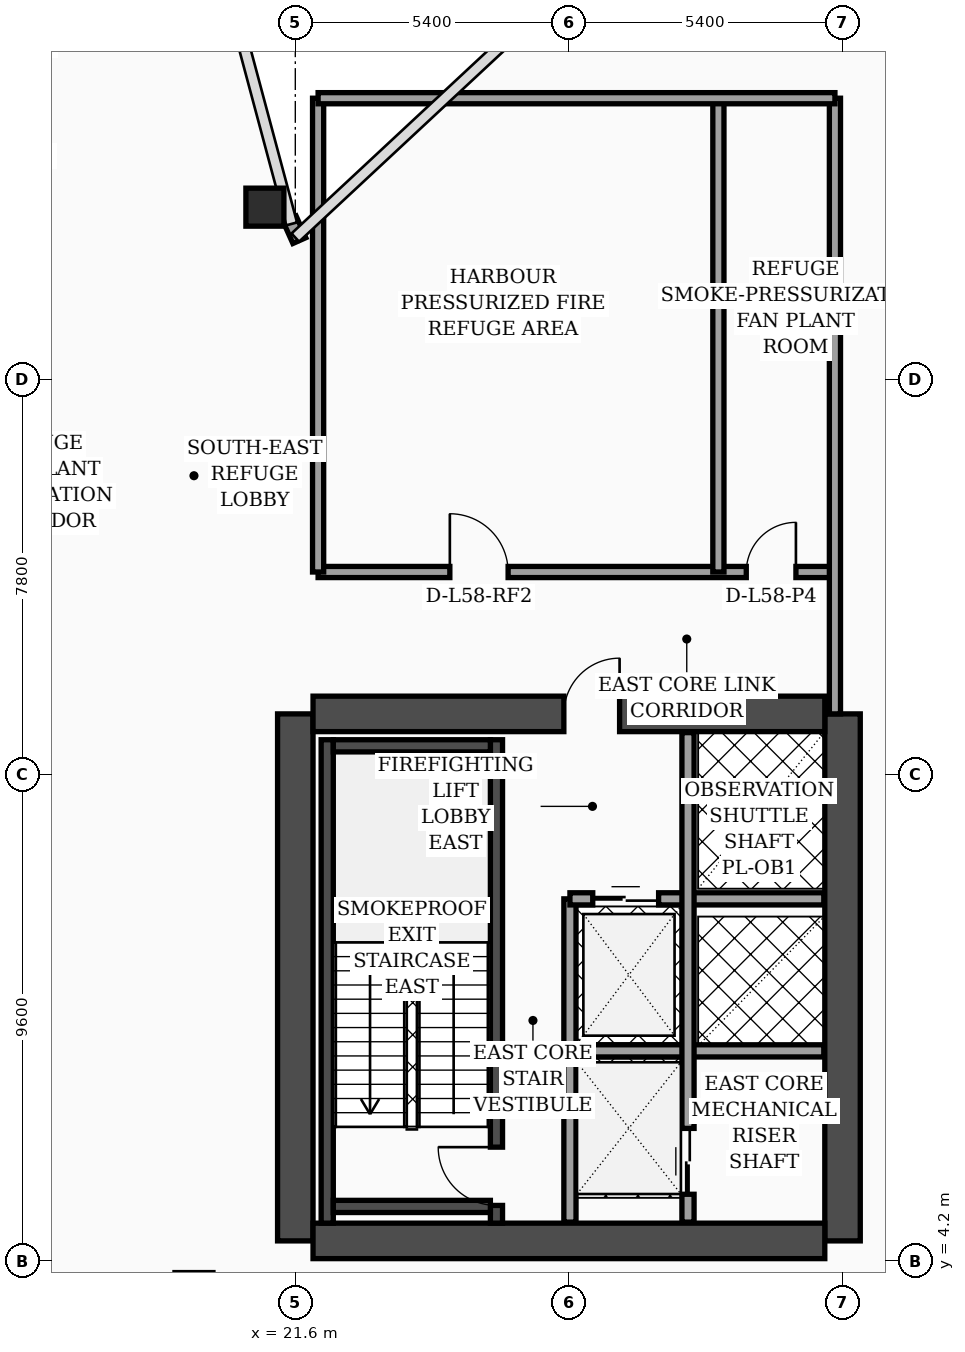
"""IFC4 building model, lengths in metres.
Left out: names, types, materials, properties, quantities, classifications, styles, units other than length and angle.
Written with IfcOpenShell. Run it as: python <this file> out.ifc"""

import sys

from ifc_helpers import new_model, si_unit, direction, frame, frame_2d, origin, origin_2d, place, context, subcontext, project, spatial, rectangle, hollow_rectangle, extrude, element, fill, save


model = new_model("IFC4")
c1 = context("Model", 3, precision=1e-05, world=origin(), true_north=direction((0.0, 1.0)))
c2 = subcontext(c1, "Body", "Model", "MODEL_VIEW")
j1 = project(units=[si_unit("LENGTHUNIT", "METRE"), si_unit("PLANEANGLEUNIT", "RADIAN")], contexts=[c1])
p1 = place(None, origin())
s1 = spatial("IfcSite", under=j1, at=p1, CompositionType="ELEMENT")
p2 = place(p1, origin())
s2 = spatial("IfcBuilding", under=s1, at=p2, CompositionType="ELEMENT")
p3 = place(p2, frame((0.0, 0.0, 234.5)))
s3 = spatial("IfcBuildingStorey", under=s2, at=p3, CompositionType="ELEMENT", Elevation=234.5)
for number, where, z_axis, x_axis in (
    (1, (21.6, 4.6, 0.0), (0.0, 0.0, 1.0), (0.0, 1.0, 0.0)),
    (2, (32.4, 4.6, 0.0), (0.0, 0.0, 1.0), (0.0, 1.0, 0.0)),
):
    element("IfcWall", number, at=place(p3, frame(where, z_axis=z_axis, x_axis=x_axis)), inside=s3, PredefinedType="SHEAR", context=c2, shape_type="SweptSolid", body=[
        extrude(rectangle(XDim=10.4, YDim=0.7, at=frame_2d((5.2, 0.0))), origin(), (0.0, 0.0, 1.0), 4.56),
    ])
p4 = place(p3, frame((21.95, 15.0, 0.0), z_axis=(0.0, 0.0, 1.0), x_axis=(1.0, 0.0, 0.0)))
e3 = element("IfcWall", 3, at=p4, inside=s3, PredefinedType="SHEAR", context=c2, shape_type="SweptSolid", body=[
    extrude(rectangle(XDim=10.1, YDim=0.7, at=frame_2d((5.05, 0.0))), origin(), (0.0, 0.0, 1.0), 4.56),
])
p5 = place(p4, frame((4.95, 0.0, 0.0)))
e4 = element("IfcOpeningElement", 4, at=p5, cuts=e3, PredefinedType="OPENING", context=c2, shape_type="SweptSolid", body=[
    extrude(rectangle(XDim=1.1, YDim=2.2, at=frame_2d((0.55, 1.1))), frame((0.0, 0.36, 0.0), z_axis=(0.0, -1.0, 0.0), x_axis=(1.0, 0.0, 0.0)), (0.0, 0.0, 1.0), 0.72),
])
p6 = place(p3, frame((21.95, 4.6, 0.0), z_axis=(0.0, 0.0, 1.0), x_axis=(1.0, 0.0, 0.0)))
e5 = element("IfcWall", 5, at=p6, inside=s3, PredefinedType="SHEAR", context=c2, shape_type="SweptSolid", body=[
    extrude(rectangle(XDim=10.1, YDim=0.7, at=frame_2d((5.05, 0.0))), origin(), (0.0, 0.0, 1.0), 4.56),
])
p7 = place(p3, frame((22.23, 4.95, 0.0), z_axis=(0.0, 0.0, 1.0), x_axis=(0.0, 1.0, 0.0)))
e6 = element("IfcWall", 6, at=p7, inside=s3, PredefinedType="SOLIDWALL", context=c2, shape_type="SweptSolid", body=[
    extrude(rectangle(XDim=9.54, YDim=0.24, at=frame_2d((4.77, 0.0))), origin(), (0.0, 0.0, 1.0), 4.56),
])
p8 = place(p3, frame((25.57, 4.95, 0.0), z_axis=(0.0, 0.0, 1.0), x_axis=(0.0, 1.0, 0.0)))
e7 = element("IfcWall", 7, at=p8, inside=s3, PredefinedType="SOLIDWALL", context=c2, shape_type="SweptSolid", body=[
    extrude(rectangle(XDim=9.54, YDim=0.24, at=frame_2d((4.77, 0.0))), origin(), (0.0, 0.0, 1.0), 4.56),
])
p9 = place(p8, frame((0.35, 0.0, 0.0)))
e8 = element("IfcOpeningElement", 8, at=p9, cuts=e7, PredefinedType="OPENING", context=c2, shape_type="SweptSolid", body=[
    extrude(rectangle(XDim=1.15, YDim=2.2, at=frame_2d((0.575, 1.1))), frame((0.0, 0.13, 0.0), z_axis=(0.0, -1.0, 0.0), x_axis=(1.0, 0.0, 0.0)), (0.0, 0.0, 1.0), 0.26),
])
for number, where, z_axis, x_axis in (
    (9, (22.35, 5.28, 0.0), (0.0, 0.0, 1.0), (1.0, 0.0, 0.0)),
    (10, (22.35, 14.37, 0.0), (0.0, 0.0, 1.0), (1.0, 0.0, 0.0)),
):
    element("IfcWall", number, at=place(p3, frame(where, z_axis=z_axis, x_axis=x_axis)), inside=s3, PredefinedType="SOLIDWALL", context=c2, shape_type="SweptSolid", body=[
        extrude(rectangle(XDim=3.1, YDim=0.24, at=frame_2d((1.55, 0.0))), origin(), (0.0, 0.0, 1.0), 4.56),
    ])
for number, where, z_axis, x_axis in (
    (11, (21.0, 25.0, 0.0), (0.0, 0.0, 1.0), (1.0, 0.0, 0.0)),
    (12, (19.6, 3.6, 0.0), (0.0, 0.0, 1.0), (1.0, 0.0, 0.0)),
):
    element("IfcColumn", number, at=place(p3, frame(where, z_axis=z_axis, x_axis=x_axis)), inside=s3, PredefinedType="COLUMN", context=c2, shape_type="SweptSolid", body=[
        extrude(hollow_rectangle(XDim=0.75, YDim=0.75, WallThickness=0.032, at=origin_2d()), origin(), (0.0, 0.0, 1.0), 4.56),
    ])
p10 = place(p3, frame((21.68, 24.34, 0.0), z_axis=(0.0, 0.0, 1.0), x_axis=(-0.40758134973, 0.913168901875, 0.0)))
e13 = element("IfcWall", 13, at=p10, inside=s3, PredefinedType="SOLIDWALL", context=c2, shape_type="SweptSolid", body=[
    extrude(rectangle(XDim=0.471, YDim=0.28, at=frame_2d((0.235, 0.0))), origin(), (0.0, 0.0, 1.0), 4.56),
])
p11 = place(p3, frame((27.02, 4.97, 0.0), z_axis=(0.0, 0.0, 1.0), x_axis=(0.0, 1.0, 0.0)))
e14 = element("IfcWall", 14, at=p11, inside=s3, PredefinedType="SOLIDWALL", context=c2, shape_type="SweptSolid", body=[
    extrude(rectangle(XDim=6.38, YDim=0.24, at=frame_2d((3.19, 0.0))), origin(), (0.0, 0.0, 1.0), 4.56),
])
p12 = place(p3, frame((27.02, 11.35, 0.0), z_axis=(0.0, 0.0, 1.0), x_axis=(1.0, 0.0, 0.0)))
e15 = element("IfcWall", 15, at=p12, inside=s3, PredefinedType="SOLIDWALL", context=c2, shape_type="SweptSolid", body=[
    extrude(rectangle(XDim=5.01, YDim=0.24, at=frame_2d((2.505, 0.0))), origin(), (0.0, 0.0, 1.0), 4.56),
])
p13 = place(p12, frame((0.45, 0.0, 0.0)))
e16 = element("IfcOpeningElement", 16, at=p13, cuts=e15, PredefinedType="OPENING", context=c2, shape_type="SweptSolid", body=[
    extrude(rectangle(XDim=1.3, YDim=2.35, at=frame_2d((0.65, 1.175))), frame((0.0, 0.13, 0.0), z_axis=(0.0, -1.0, 0.0), x_axis=(1.0, 0.0, 0.0)), (0.0, 0.0, 1.0), 0.26),
])
p14 = place(p3, frame((27.02, 8.35, 0.0), z_axis=(0.0, 0.0, 1.0), x_axis=(1.0, 0.0, 0.0)))
e17 = element("IfcWall", 17, at=p14, inside=s3, PredefinedType="SOLIDWALL", context=c2, shape_type="SweptSolid", body=[
    extrude(rectangle(XDim=5.01, YDim=0.24, at=frame_2d((2.505, 0.0))), origin(), (0.0, 0.0, 1.0), 4.09),
])
p15 = place(p3, frame((29.35, 4.97, 0.0), z_axis=(0.0, 0.0, 1.0), x_axis=(0.0, 1.0, 0.0)))
e18 = element("IfcWall", 18, at=p15, inside=s3, PredefinedType="SOLIDWALL", context=c2, shape_type="SweptSolid", body=[
    extrude(rectangle(XDim=9.66, YDim=0.24, at=frame_2d((4.83, 0.0))), origin(), (0.0, 0.0, 1.0), 4.56),
])
p16 = place(p15, frame((0.55, 0.0, 0.0)))
e19 = element("IfcOpeningElement", 19, at=p16, cuts=e18, PredefinedType="OPENING", context=c2, shape_type="SweptSolid", body=[
    extrude(rectangle(XDim=1.3, YDim=2.35, at=frame_2d((0.65, 1.175))), frame((0.0, 0.13, 0.0), z_axis=(0.0, -1.0, 0.0), x_axis=(1.0, 0.0, 0.0)), (0.0, 0.0, 1.0), 0.26),
])
p17 = place(p3, frame((22.05, 17.8, 0.0), z_axis=(0.0, 0.0, 1.0), x_axis=(1.0, 0.0, 0.0)))
e20 = element("IfcWall", 20, at=p17, inside=s3, PredefinedType="SOLIDWALL", context=c2, shape_type="SweptSolid", body=[
    extrude(rectangle(XDim=10.2, YDim=0.22, at=frame_2d((5.1, 0.0))), origin(), (0.0, 0.0, 1.0), 3.94),
])
p18 = place(p17, frame((2.6, 0.0, 0.0)))
e21 = element("IfcOpeningElement", 21, at=p18, cuts=e20, PredefinedType="OPENING", context=c2, shape_type="SweptSolid", body=[
    extrude(rectangle(XDim=1.15, YDim=2.2, at=frame_2d((0.575, 1.1))), frame((0.0, 0.12, 0.0), z_axis=(0.0, -1.0, 0.0), x_axis=(1.0, 0.0, 0.0)), (0.0, 0.0, 1.0), 0.24),
])
p19 = place(p17, frame((8.45, 0.0, 0.0)))
e22 = element("IfcOpeningElement", 22, at=p19, cuts=e20, PredefinedType="OPENING", context=c2, shape_type="SweptSolid", body=[
    extrude(rectangle(XDim=0.98, YDim=2.15, at=frame_2d((0.49, 1.075))), frame((0.0, 0.12, 0.0), z_axis=(0.0, -1.0, 0.0), x_axis=(1.0, 0.0, 0.0)), (0.0, 0.0, 1.0), 0.24),
])
p20 = place(p3, frame((29.95, 17.8, 0.0), z_axis=(0.0, 0.0, 1.0), x_axis=(0.0, 1.0, 0.0)))
e23 = element("IfcWall", 23, at=p20, inside=s3, PredefinedType="SOLIDWALL", context=c2, shape_type="SweptSolid", body=[
    extrude(rectangle(XDim=9.35, YDim=0.22, at=frame_2d((4.675, 0.0))), origin(), (0.0, 0.0, 1.0), 3.94),
])
p21 = place(p3, frame((22.05, 17.8, 0.0), z_axis=(0.0, 0.0, 1.0), x_axis=(0.0, 1.0, 0.0)))
e24 = element("IfcWall", 24, at=p21, inside=s3, PredefinedType="SOLIDWALL", context=c2, shape_type="SweptSolid", body=[
    extrude(rectangle(XDim=9.35, YDim=0.22, at=frame_2d((4.675, 0.0))), origin(), (0.0, 0.0, 1.0), 4.09),
])
p22 = place(p3, frame((32.25, 15.0, 0.0), z_axis=(0.0, 0.0, 1.0), x_axis=(0.0, 1.0, 0.0)))
e25 = element("IfcWall", 25, at=p22, inside=s3, PredefinedType="SOLIDWALL", context=c2, shape_type="SweptSolid", body=[
    extrude(rectangle(XDim=12.15, YDim=0.22, at=frame_2d((6.075, 0.0))), origin(), (0.0, 0.0, 1.0), 3.94),
])
p23 = place(p3, frame((22.05, 27.15, 0.0), z_axis=(0.0, 0.0, 1.0), x_axis=(1.0, 0.0, 0.0)))
e26 = element("IfcWall", 26, at=p23, inside=s3, PredefinedType="SOLIDWALL", context=c2, shape_type="SweptSolid", body=[
    extrude(rectangle(XDim=10.2, YDim=0.22, at=frame_2d((5.1, 0.0))), origin(), (0.0, 0.0, 1.0), 4.09),
])
p24 = place(p13, origin())
e27 = element("IfcDoor", 27, at=p24, inside=s3, OperationType="DOUBLE_DOOR_SLIDING", PredefinedType="DOOR", context=c2, shape_type="SweptSolid", body=[
    extrude(rectangle(XDim=1.3, YDim=2.35, at=frame_2d((0.65, 1.175))), frame((0.0, 0.025, 0.0), z_axis=(0.0, -1.0, 0.0), x_axis=(1.0, 0.0, 0.0)), (0.0, 0.0, 1.0), 0.05),
])
fill(e16, e27)
p25 = place(p16, origin())
e28 = element("IfcDoor", 28, at=p25, inside=s3, OperationType="DOUBLE_DOOR_SLIDING", PredefinedType="DOOR", context=c2, shape_type="SweptSolid", body=[
    extrude(rectangle(XDim=1.3, YDim=2.35, at=frame_2d((0.65, 1.175))), frame((0.0, 0.025, 0.0), z_axis=(0.0, -1.0, 0.0), x_axis=(1.0, 0.0, 0.0)), (0.0, 0.0, 1.0), 0.05),
])
fill(e19, e28)
p26 = place(p18, origin())
e29 = element("IfcDoor", 29, at=p26, inside=s3, OperationType="SINGLE_SWING_LEFT", PredefinedType="DOOR", context=c2, shape_type="SweptSolid", body=[
    extrude(rectangle(XDim=1.15, YDim=2.2, at=frame_2d((0.575, 1.1))), frame((0.0, 0.025, 0.0), z_axis=(0.0, -1.0, 0.0), x_axis=(1.0, 0.0, 0.0)), (0.0, 0.0, 1.0), 0.05),
])
fill(e21, e29)
p27 = place(p19, origin())
e30 = element("IfcDoor", 30, at=p27, inside=s3, OperationType="SINGLE_SWING_RIGHT", PredefinedType="DOOR", context=c2, shape_type="SweptSolid", body=[
    extrude(rectangle(XDim=0.98, YDim=2.15, at=frame_2d((0.49, 1.075))), frame((0.0, 0.025, 0.0), z_axis=(0.0, -1.0, 0.0), x_axis=(1.0, 0.0, 0.0)), (0.0, 0.0, 1.0), 0.05),
])
fill(e22, e30)
p28 = place(p9, origin())
e31 = element("IfcDoor", 31, at=p28, inside=s3, OperationType="SINGLE_SWING_RIGHT", PredefinedType="DOOR", context=c2, shape_type="SweptSolid", body=[
    extrude(rectangle(XDim=1.15, YDim=2.2, at=frame_2d((0.575, 1.1))), frame((0.0, 0.025, 0.0), z_axis=(0.0, -1.0, 0.0), x_axis=(1.0, 0.0, 0.0)), (0.0, 0.0, 1.0), 0.05),
])
fill(e8, e31)
p29 = place(p5, origin())
e32 = element("IfcDoor", 32, at=p29, inside=s3, OperationType="SINGLE_SWING_RIGHT", PredefinedType="DOOR", context=c2, shape_type="SweptSolid", body=[
    extrude(rectangle(XDim=1.1, YDim=2.2, at=frame_2d((0.55, 1.1))), frame((0.0, 0.025, 0.0), z_axis=(0.0, -1.0, 0.0), x_axis=(1.0, 0.0, 0.0)), (0.0, 0.0, 1.0), 0.05),
])
fill(e4, e32)
save(model, sys.argv[1])
